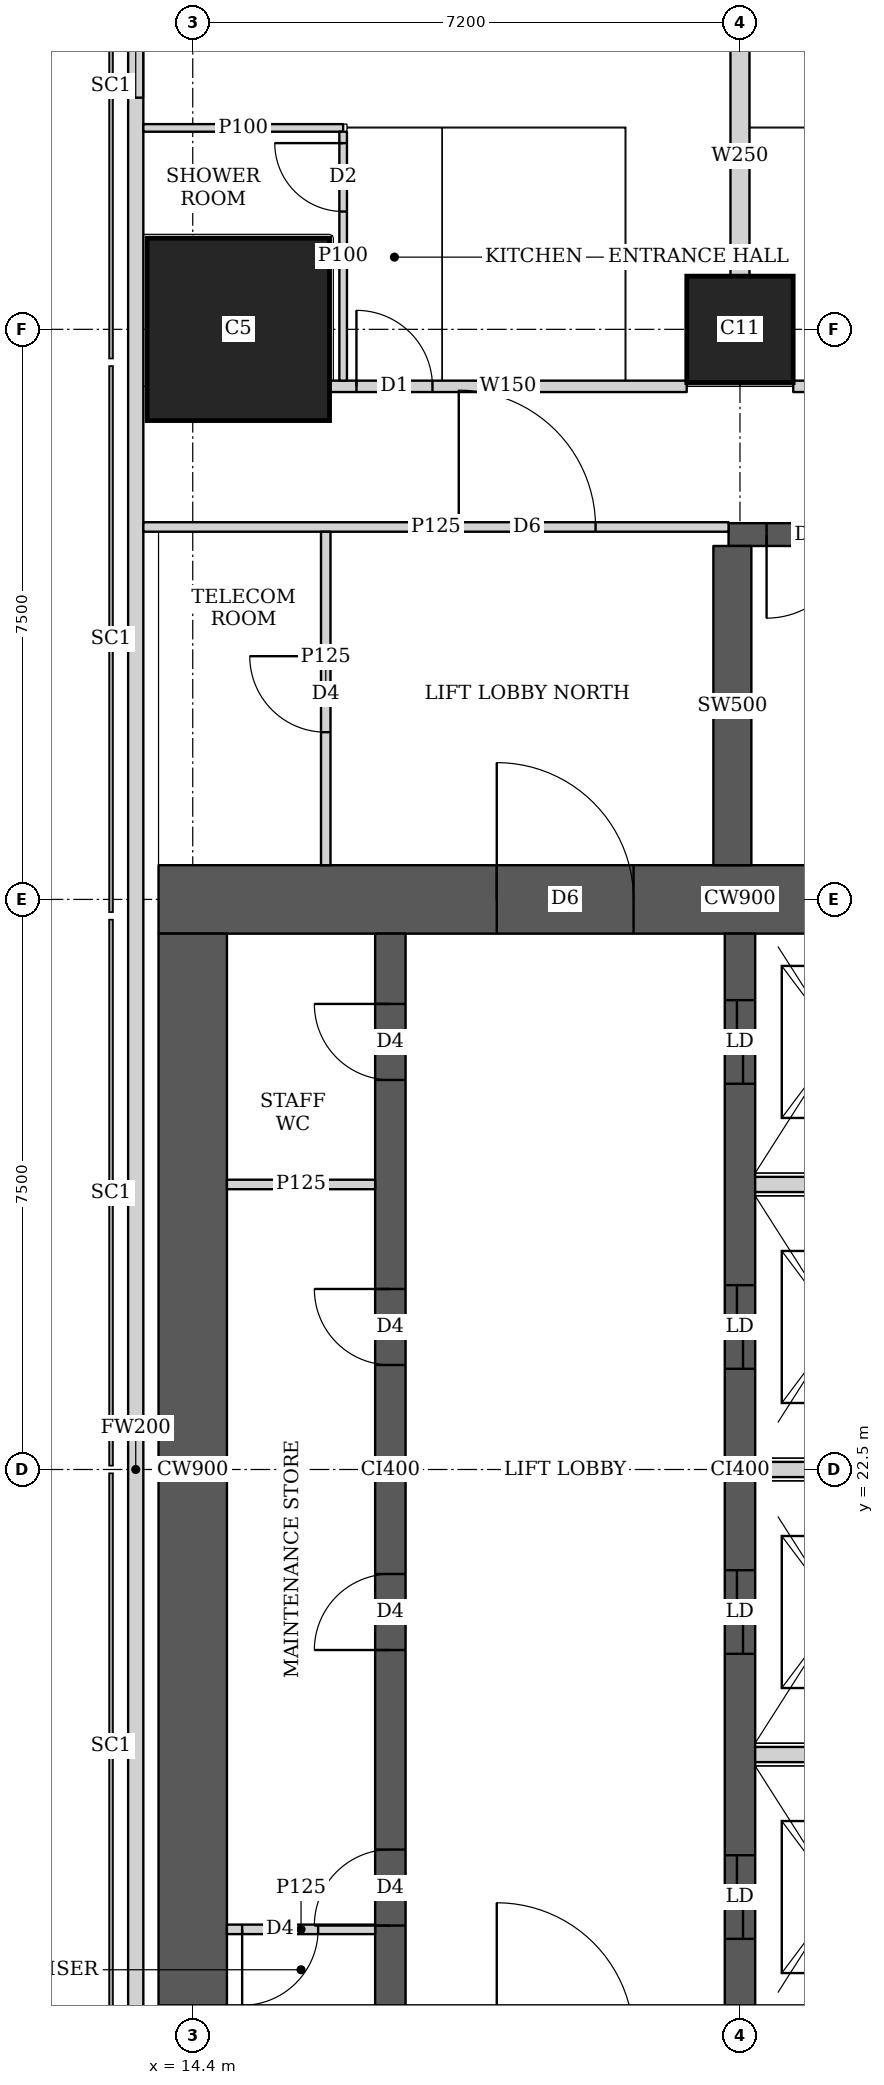
"""IFC4 building model, lengths in metres.
Left out: names, types, materials, properties, quantities, classifications, styles, units other than length and angle.
Written with IfcOpenShell. Run it as: python <this file> out.ifc"""

import sys

from ifc_helpers import new_model, si_unit, direction, frame, frame_2d, origin, origin_2d, place, context, subcontext, project, spatial, rectangle, extrude, element, fill, save


model = new_model("IFC4")
c1 = context("Model", 3, precision=1e-05, world=origin(), true_north=direction((0.0, 1.0)))
c2 = subcontext(c1, "Body", "Model", "MODEL_VIEW")
j1 = project(units=[si_unit("LENGTHUNIT", "METRE"), si_unit("PLANEANGLEUNIT", "RADIAN")], contexts=[c1])
p1 = place(None, origin())
s1 = spatial("IfcSite", under=j1, at=p1, CompositionType="ELEMENT")
p2 = place(p1, origin())
s2 = spatial("IfcBuilding", under=s1, at=p2, CompositionType="ELEMENT")
p3 = place(p2, frame((0.0, 0.0, 234.95)))
s3 = spatial("IfcBuildingStorey", under=s2, at=p3, CompositionType="ELEMENT", Elevation=234.95)
p4 = place(p3, frame((15.0, 37.5, 0.0), z_axis=(0.0, 0.0, 1.0), x_axis=(1.0, 0.0, 0.0)))
e1 = element("IfcColumn", 1, at=p4, inside=s3, PredefinedType="COLUMN", context=c2, shape_type="SweptSolid", body=[
    extrude(rectangle(XDim=2.4, YDim=2.4, at=origin_2d()), origin(), (0.0, 0.0, 1.0), 3.75),
])
p5 = place(p3, frame((21.6, 37.5, 0.0), z_axis=(0.0, 0.0, 1.0), x_axis=(1.0, 0.0, 0.0)))
e2 = element("IfcColumn", 2, at=p5, inside=s3, PredefinedType="COLUMN", context=c2, shape_type="SweptSolid", body=[
    extrude(rectangle(XDim=1.4, YDim=1.4, at=origin_2d()), origin(), (0.0, 0.0, 1.0), 3.75),
])
p6 = place(p3, frame((13.95, 30.0, 0.0), z_axis=(0.0, 0.0, 1.0), x_axis=(1.0, 0.0, 0.0)))
e3 = element("IfcWall", 3, at=p6, inside=s3, PredefinedType="SHEAR", context=c2, shape_type="SweptSolid", body=[
    extrude(rectangle(XDim=15.3, YDim=0.9, at=frame_2d((7.65, 0.0))), origin(), (0.0, 0.0, 1.0), 3.75),
])
p7 = place(p6, frame((4.45, 0.0, 0.0)))
e4 = element("IfcOpeningElement", 4, at=p7, cuts=e3, PredefinedType="OPENING", context=c2, shape_type="SweptSolid", body=[
    extrude(rectangle(XDim=1.8, YDim=2.1, at=frame_2d((0.9, 1.05))), frame((0.0, 0.46, 0.0), z_axis=(0.0, -1.0, 0.0), x_axis=(1.0, 0.0, 0.0)), (0.0, 0.0, 1.0), 0.92),
])
p8 = place(p6, frame((10.7, 0.0, 0.0)))
e5 = element("IfcOpeningElement", 5, at=p8, cuts=e3, PredefinedType="OPENING", context=c2, shape_type="SweptSolid", body=[
    extrude(rectangle(XDim=1.1, YDim=2.1, at=frame_2d((0.55, 1.05))), frame((0.0, 0.46, 0.0), z_axis=(0.0, -1.0, 0.0), x_axis=(1.0, 0.0, 0.0)), (0.0, 0.0, 1.0), 0.92),
])
p9 = place(p3, frame((14.4, 15.45, 0.0), z_axis=(0.0, 0.0, 1.0), x_axis=(0.0, 1.0, 0.0)))
e6 = element("IfcWall", 6, at=p9, inside=s3, PredefinedType="SHEAR", context=c2, shape_type="SweptSolid", body=[
    extrude(rectangle(XDim=14.1, YDim=0.9, at=frame_2d((7.05, 0.0))), origin(), (0.0, 0.0, 1.0), 3.75),
])
p10 = place(p3, frame((17.0, 15.45, 0.0), z_axis=(0.0, 0.0, 1.0), x_axis=(0.0, 1.0, 0.0)))
e7 = element("IfcWall", 7, at=p10, inside=s3, PredefinedType="SHEAR", context=c2, shape_type="SweptSolid", body=[
    extrude(rectangle(XDim=14.1, YDim=0.4, at=frame_2d((7.05, 0.0))), origin(), (0.0, 0.0, 1.0), 3.75),
])
p11 = place(p10, frame((1.05, 0.0, 0.0)))
e8 = element("IfcOpeningElement", 8, at=p11, cuts=e7, PredefinedType="OPENING", context=c2, shape_type="SweptSolid", body=[
    extrude(rectangle(XDim=1.0, YDim=2.1, at=frame_2d((0.5, 1.05))), frame((0.0, 0.21, 0.0), z_axis=(0.0, -1.0, 0.0), x_axis=(1.0, 0.0, 0.0)), (0.0, 0.0, 1.0), 0.42),
])
p12 = place(p10, frame((4.675, 0.0, 0.0)))
e9 = element("IfcOpeningElement", 9, at=p12, cuts=e7, PredefinedType="OPENING", context=c2, shape_type="SweptSolid", body=[
    extrude(rectangle(XDim=1.0, YDim=2.1, at=frame_2d((0.5, 1.05))), frame((0.0, 0.21, 0.0), z_axis=(0.0, -1.0, 0.0), x_axis=(1.0, 0.0, 0.0)), (0.0, 0.0, 1.0), 0.42),
])
p13 = place(p10, frame((8.425, 0.0, 0.0)))
e10 = element("IfcOpeningElement", 10, at=p13, cuts=e7, PredefinedType="OPENING", context=c2, shape_type="SweptSolid", body=[
    extrude(rectangle(XDim=1.0, YDim=2.1, at=frame_2d((0.5, 1.05))), frame((0.0, 0.21, 0.0), z_axis=(0.0, -1.0, 0.0), x_axis=(1.0, 0.0, 0.0)), (0.0, 0.0, 1.0), 0.42),
])
p14 = place(p10, frame((12.175, 0.0, 0.0)))
e11 = element("IfcOpeningElement", 11, at=p14, cuts=e7, PredefinedType="OPENING", context=c2, shape_type="SweptSolid", body=[
    extrude(rectangle(XDim=1.0, YDim=2.1, at=frame_2d((0.5, 1.05))), frame((0.0, 0.21, 0.0), z_axis=(0.0, -1.0, 0.0), x_axis=(1.0, 0.0, 0.0)), (0.0, 0.0, 1.0), 0.42),
])
p15 = place(p3, frame((21.6, 15.45, 0.0), z_axis=(0.0, 0.0, 1.0), x_axis=(0.0, 1.0, 0.0)))
e12 = element("IfcWall", 12, at=p15, inside=s3, PredefinedType="SHEAR", context=c2, shape_type="SweptSolid", body=[
    extrude(rectangle(XDim=14.1, YDim=0.4, at=frame_2d((7.05, 0.0))), origin(), (0.0, 0.0, 1.0), 3.75),
])
p16 = place(p15, frame((0.875, 0.0, 0.0)))
e13 = element("IfcOpeningElement", 13, at=p16, cuts=e12, PredefinedType="OPENING", context=c2, shape_type="SweptSolid", body=[
    extrude(rectangle(XDim=1.1, YDim=2.1, at=frame_2d((0.55, 1.05))), frame((0.0, 0.21, 0.0), z_axis=(0.0, -1.0, 0.0), x_axis=(1.0, 0.0, 0.0)), (0.0, 0.0, 1.0), 0.42),
])
p17 = place(p15, frame((4.625, 0.0, 0.0)))
e14 = element("IfcOpeningElement", 14, at=p17, cuts=e12, PredefinedType="OPENING", context=c2, shape_type="SweptSolid", body=[
    extrude(rectangle(XDim=1.1, YDim=2.1, at=frame_2d((0.55, 1.05))), frame((0.0, 0.21, 0.0), z_axis=(0.0, -1.0, 0.0), x_axis=(1.0, 0.0, 0.0)), (0.0, 0.0, 1.0), 0.42),
])
p18 = place(p15, frame((8.375, 0.0, 0.0)))
e15 = element("IfcOpeningElement", 15, at=p18, cuts=e12, PredefinedType="OPENING", context=c2, shape_type="SweptSolid", body=[
    extrude(rectangle(XDim=1.1, YDim=2.1, at=frame_2d((0.55, 1.05))), frame((0.0, 0.21, 0.0), z_axis=(0.0, -1.0, 0.0), x_axis=(1.0, 0.0, 0.0)), (0.0, 0.0, 1.0), 0.42),
])
p19 = place(p15, frame((12.125, 0.0, 0.0)))
e16 = element("IfcOpeningElement", 16, at=p19, cuts=e12, PredefinedType="OPENING", context=c2, shape_type="SweptSolid", body=[
    extrude(rectangle(XDim=1.1, YDim=2.1, at=frame_2d((0.55, 1.05))), frame((0.0, 0.21, 0.0), z_axis=(0.0, -1.0, 0.0), x_axis=(1.0, 0.0, 0.0)), (0.0, 0.0, 1.0), 0.42),
])
p20 = place(p3, frame((21.45, 34.8, 0.0), z_axis=(0.0, 0.0, 1.0), x_axis=(1.0, 0.0, 0.0)))
e17 = element("IfcWall", 17, at=p20, inside=s3, PredefinedType="SHEAR", context=c2, shape_type="SweptSolid", body=[
    extrude(rectangle(XDim=7.5, YDim=0.3, at=frame_2d((3.75, 0.0))), origin(), (0.0, 0.0, 1.0), 3.75),
])
p21 = place(p20, frame((0.5, 0.0, 0.0)))
e18 = element("IfcOpeningElement", 18, at=p21, cuts=e17, PredefinedType="OPENING", context=c2, shape_type="SweptSolid", body=[
    extrude(rectangle(XDim=1.1, YDim=2.1, at=frame_2d((0.55, 1.05))), frame((0.0, 0.16, 0.0), z_axis=(0.0, -1.0, 0.0), x_axis=(1.0, 0.0, 0.0)), (0.0, 0.0, 1.0), 0.32),
])
p22 = place(p3, frame((21.5, 30.45, 0.0), z_axis=(0.0, 0.0, 1.0), x_axis=(0.0, 1.0, 0.0)))
e19 = element("IfcWall", 19, at=p22, inside=s3, PredefinedType="SHEAR", context=c2, shape_type="SweptSolid", body=[
    extrude(rectangle(XDim=4.2, YDim=0.5, at=frame_2d((2.1, 0.0))), origin(), (0.0, 0.0, 1.0), 3.75),
])
p23 = place(p3, frame((13.65, 44.837, 0.0), z_axis=(0.0, 0.0, 1.0), x_axis=(0.0, -1.0, 0.0)))
e20 = element("IfcWall", 20, at=p23, inside=s3, PredefinedType="SOLIDWALL", context=c2, shape_type="SweptSolid", body=[
    extrude(rectangle(XDim=44.674, YDim=0.2, at=frame_2d((22.337, 0.0))), origin(), (0.0, 0.0, 1.0), 3.5),
])
p24 = place(p23, frame((1.889, 0.0, 0.9)))
e21 = element("IfcOpeningElement", 21, at=p24, cuts=e20, PredefinedType="OPENING", context=c2, shape_type="SweptSolid", body=[
    extrude(rectangle(XDim=2.4, YDim=1.5, at=frame_2d((1.2, 0.75))), frame((0.0, 0.11, 0.0), z_axis=(0.0, -1.0, 0.0), x_axis=(1.0, 0.0, 0.0)), (0.0, 0.0, 1.0), 0.22),
])
p25 = place(p23, frame((40.385, 0.0, 0.9)))
e22 = element("IfcOpeningElement", 22, at=p25, cuts=e20, PredefinedType="OPENING", context=c2, shape_type="SweptSolid", body=[
    extrude(rectangle(XDim=2.4, YDim=1.5, at=frame_2d((1.2, 0.75))), frame((0.0, 0.11, 0.0), z_axis=(0.0, -1.0, 0.0), x_axis=(1.0, 0.0, 0.0)), (0.0, 0.0, 1.0), 0.22),
])
p26 = place(p3, frame((16.201, 36.75, 0.0), z_axis=(0.0, 0.0, 1.0), x_axis=(1.0, 0.0, 0.0)))
e23 = element("IfcWall", 23, at=p26, inside=s3, PredefinedType="SOLIDWALL", context=c2, shape_type="SweptSolid", body=[
    extrude(rectangle(XDim=4.698, YDim=0.15, at=frame_2d((2.349, 0.0))), origin(), (0.0, 0.0, 1.0), 3.5),
])
p27 = place(p26, frame((0.353, 0.0, 0.0)))
e24 = element("IfcOpeningElement", 24, at=p27, cuts=e23, PredefinedType="OPENING", context=c2, shape_type="SweptSolid", body=[
    extrude(rectangle(XDim=1.0, YDim=2.1, at=frame_2d((0.5, 1.05))), frame((0.0, 0.085, 0.0), z_axis=(0.0, -1.0, 0.0), x_axis=(1.0, 0.0, 0.0)), (0.0, 0.0, 1.0), 0.17),
])
p28 = place(p3, frame((22.301, 36.75, 0.0), z_axis=(0.0, 0.0, 1.0), x_axis=(1.0, 0.0, 0.0)))
e25 = element("IfcWall", 25, at=p28, inside=s3, PredefinedType="SOLIDWALL", context=c2, shape_type="SweptSolid", body=[
    extrude(rectangle(XDim=5.798, YDim=0.15, at=frame_2d((2.899, 0.0))), origin(), (0.0, 0.0, 1.0), 3.5),
])
p29 = place(p28, frame((0.799, 0.0, 0.0)))
e26 = element("IfcOpeningElement", 26, at=p29, cuts=e25, PredefinedType="OPENING", context=c2, shape_type="SweptSolid", body=[
    extrude(rectangle(XDim=1.0, YDim=2.1, at=frame_2d((0.5, 1.05))), frame((0.0, 0.085, 0.0), z_axis=(0.0, -1.0, 0.0), x_axis=(1.0, 0.0, 0.0)), (0.0, 0.0, 1.0), 0.17),
])
p30 = place(p3, frame((13.75, 40.15, 0.0), z_axis=(0.0, 0.0, 1.0), x_axis=(1.0, 0.0, 0.0)))
e27 = element("IfcWall", 27, at=p30, inside=s3, PredefinedType="PARTITIONING", context=c2, shape_type="SweptSolid", body=[
    extrude(rectangle(XDim=2.629, YDim=0.1, at=frame_2d((1.314, 0.0))), origin(), (0.0, 0.0, 1.0), 2.05),
])
p31 = place(p3, frame((16.379, 36.825, 0.0), z_axis=(0.0, 0.0, 1.0), x_axis=(0.0, 1.0, 0.0)))
e28 = element("IfcWall", 28, at=p31, inside=s3, PredefinedType="PARTITIONING", context=c2, shape_type="SweptSolid", body=[
    extrude(rectangle(XDim=3.275, YDim=0.1, at=frame_2d((1.638, 0.0))), origin(), (0.0, 0.0, 1.0), 3.5),
])
p32 = place(p31, frame((2.225, 0.0, 0.0)))
e29 = element("IfcOpeningElement", 29, at=p32, cuts=e28, PredefinedType="OPENING", context=c2, shape_type="SweptSolid", body=[
    extrude(rectangle(XDim=0.9, YDim=2.1, at=frame_2d((0.45, 1.05))), frame((0.0, 0.06, 0.0), z_axis=(0.0, -1.0, 0.0), x_axis=(1.0, 0.0, 0.0)), (0.0, 0.0, 1.0), 0.12),
])
p33 = place(p3, frame((21.6, 38.201, 0.0), z_axis=(0.0, 0.0, 1.0), x_axis=(0.0, 1.0, 0.0)))
e30 = element("IfcWall", 30, at=p33, inside=s3, PredefinedType="SOLIDWALL", context=c2, shape_type="SweptSolid", body=[
    extrude(rectangle(XDim=3.149, YDim=0.25, at=frame_2d((1.575, 0.0))), origin(), (0.0, 0.0, 1.0), 3.5),
])
p34 = place(p3, frame((13.75, 34.9, 0.0), z_axis=(0.0, 0.0, 1.0), x_axis=(1.0, 0.0, 0.0)))
e31 = element("IfcWall", 31, at=p34, inside=s3, PredefinedType="PARTITIONING", context=c2, shape_type="SweptSolid", body=[
    extrude(rectangle(XDim=7.7, YDim=0.125, at=frame_2d((3.85, 0.0))), origin(), (0.0, 0.0, 1.0), 3.5),
])
p35 = place(p34, frame((4.15, 0.0, 0.0)))
e32 = element("IfcOpeningElement", 32, at=p35, cuts=e31, PredefinedType="OPENING", context=c2, shape_type="SweptSolid", body=[
    extrude(rectangle(XDim=1.8, YDim=2.1, at=frame_2d((0.9, 1.05))), frame((0.0, 0.073, 0.0), z_axis=(0.0, -1.0, 0.0), x_axis=(1.0, 0.0, 0.0)), (0.0, 0.0, 1.0), 0.145),
])
p36 = place(p3, frame((16.15, 30.45, 0.0), z_axis=(0.0, 0.0, 1.0), x_axis=(0.0, 1.0, 0.0)))
e33 = element("IfcWall", 33, at=p36, inside=s3, PredefinedType="PARTITIONING", context=c2, shape_type="SweptSolid", body=[
    extrude(rectangle(XDim=4.387, YDim=0.125, at=frame_2d((2.193, 0.0))), origin(), (0.0, 0.0, 1.0), 3.5),
])
p37 = place(p36, frame((1.75, 0.0, 0.0)))
e34 = element("IfcOpeningElement", 34, at=p37, cuts=e33, PredefinedType="OPENING", context=c2, shape_type="SweptSolid", body=[
    extrude(rectangle(XDim=1.0, YDim=2.1, at=frame_2d((0.5, 1.05))), frame((0.0, 0.073, 0.0), z_axis=(0.0, -1.0, 0.0), x_axis=(1.0, 0.0, 0.0)), (0.0, 0.0, 1.0), 0.145),
])
p38 = place(p3, frame((14.85, 16.45, 0.0), z_axis=(0.0, 0.0, 1.0), x_axis=(1.0, 0.0, 0.0)))
e35 = element("IfcWall", 35, at=p38, inside=s3, PredefinedType="PARTITIONING", context=c2, shape_type="SweptSolid", body=[
    extrude(rectangle(XDim=1.95, YDim=0.125, at=frame_2d((0.975, 0.0))), origin(), (0.0, 0.0, 1.0), 3.5),
])
p39 = place(p38, frame((0.2, 0.0, 0.0)))
e36 = element("IfcOpeningElement", 36, at=p39, cuts=e35, PredefinedType="OPENING", context=c2, shape_type="SweptSolid", body=[
    extrude(rectangle(XDim=1.0, YDim=2.1, at=frame_2d((0.5, 1.05))), frame((0.0, 0.073, 0.0), z_axis=(0.0, -1.0, 0.0), x_axis=(1.0, 0.0, 0.0)), (0.0, 0.0, 1.0), 0.145),
])
p40 = place(p3, frame((14.85, 26.25, 0.0), z_axis=(0.0, 0.0, 1.0), x_axis=(1.0, 0.0, 0.0)))
e37 = element("IfcWall", 37, at=p40, inside=s3, PredefinedType="PARTITIONING", context=c2, shape_type="SweptSolid", body=[
    extrude(rectangle(XDim=1.95, YDim=0.125, at=frame_2d((0.975, 0.0))), origin(), (0.0, 0.0, 1.0), 3.5),
])
for number, where, z_axis, x_axis in (
    (38, (21.8, 18.75, 0.0), (0.0, 0.0, 1.0), (1.0, 0.0, 0.0)),
    (39, (21.8, 22.5, 0.0), (0.0, 0.0, 1.0), (1.0, 0.0, 0.0)),
    (40, (21.8, 26.25, 0.0), (0.0, 0.0, 1.0), (1.0, 0.0, 0.0)),
):
    element("IfcWall", number, at=place(p3, frame(where, z_axis=z_axis, x_axis=x_axis)), inside=s3, PredefinedType="SOLIDWALL", context=c2, shape_type="SweptSolid", body=[
        extrude(rectangle(XDim=2.2, YDim=0.2, at=frame_2d((1.1, 0.0))), origin(), (0.0, 0.0, 1.0), 3.5),
    ])
p41 = place(p24, origin())
e41 = element("IfcWindow", 41, at=p41, inside=s3, PartitioningType="SINGLE_PANEL", PredefinedType="WINDOW", context=c2, shape_type="SweptSolid", body=[
    extrude(rectangle(XDim=2.4, YDim=1.5, at=frame_2d((1.2, 0.75))), frame((0.0, 0.03, 0.0), z_axis=(0.0, -1.0, 0.0), x_axis=(1.0, 0.0, 0.0)), (0.0, 0.0, 1.0), 0.06),
])
fill(e21, e41)
p42 = place(p32, origin())
e42 = element("IfcDoor", 42, at=p42, inside=s3, OperationType="SINGLE_SWING_RIGHT", PredefinedType="DOOR", context=c2, shape_type="SweptSolid", body=[
    extrude(rectangle(XDim=0.9, YDim=2.1, at=frame_2d((0.45, 1.05))), frame((0.0, 0.025, 0.0), z_axis=(0.0, -1.0, 0.0), x_axis=(1.0, 0.0, 0.0)), (0.0, 0.0, 1.0), 0.05),
])
fill(e29, e42)
p43 = place(p27, origin())
e43 = element("IfcDoor", 43, at=p43, inside=s3, OperationType="SINGLE_SWING_LEFT", PredefinedType="DOOR", context=c2, shape_type="SweptSolid", body=[
    extrude(rectangle(XDim=1.0, YDim=2.1, at=frame_2d((0.5, 1.05))), frame((0.0, 0.025, 0.0), z_axis=(0.0, -1.0, 0.0), x_axis=(1.0, 0.0, 0.0)), (0.0, 0.0, 1.0), 0.05),
])
fill(e24, e43)
p44 = place(p37, origin())
e44 = element("IfcDoor", 44, at=p44, inside=s3, OperationType="SINGLE_SWING_RIGHT", PredefinedType="DOOR", context=c2, shape_type="SweptSolid", body=[
    extrude(rectangle(XDim=1.0, YDim=2.1, at=frame_2d((0.5, 1.05))), frame((0.0, 0.025, 0.0), z_axis=(0.0, -1.0, 0.0), x_axis=(1.0, 0.0, 0.0)), (0.0, 0.0, 1.0), 0.05),
])
fill(e34, e44)
p45 = place(p35, origin())
e45 = element("IfcDoor", 45, at=p45, inside=s3, OperationType="DOUBLE_DOOR_SINGLE_SWING", PredefinedType="DOOR", context=c2, shape_type="SweptSolid", body=[
    extrude(rectangle(XDim=1.8, YDim=2.1, at=frame_2d((0.9, 1.05))), frame((0.0, 0.025, 0.0), z_axis=(0.0, -1.0, 0.0), x_axis=(1.0, 0.0, 0.0)), (0.0, 0.0, 1.0), 0.05),
])
fill(e32, e45)
p46 = place(p39, origin())
e46 = element("IfcDoor", 46, at=p46, inside=s3, OperationType="SINGLE_SWING_RIGHT", PredefinedType="DOOR", context=c2, shape_type="SweptSolid", body=[
    extrude(rectangle(XDim=1.0, YDim=2.1, at=frame_2d((0.5, 1.05))), frame((0.0, 0.025, 0.0), z_axis=(0.0, -1.0, 0.0), x_axis=(1.0, 0.0, 0.0)), (0.0, 0.0, 1.0), 0.05),
])
fill(e36, e46)
p47 = place(p11, origin())
e47 = element("IfcDoor", 47, at=p47, inside=s3, OperationType="SINGLE_SWING_LEFT", PredefinedType="DOOR", context=c2, shape_type="SweptSolid", body=[
    extrude(rectangle(XDim=1.0, YDim=2.1, at=frame_2d((0.5, 1.05))), frame((0.0, 0.025, 0.0), z_axis=(0.0, -1.0, 0.0), x_axis=(1.0, 0.0, 0.0)), (0.0, 0.0, 1.0), 0.05),
])
fill(e8, e47)
p48 = place(p12, origin())
e48 = element("IfcDoor", 48, at=p48, inside=s3, OperationType="SINGLE_SWING_LEFT", PredefinedType="DOOR", context=c2, shape_type="SweptSolid", body=[
    extrude(rectangle(XDim=1.0, YDim=2.1, at=frame_2d((0.5, 1.05))), frame((0.0, 0.025, 0.0), z_axis=(0.0, -1.0, 0.0), x_axis=(1.0, 0.0, 0.0)), (0.0, 0.0, 1.0), 0.05),
])
fill(e9, e48)
p49 = place(p13, origin())
e49 = element("IfcDoor", 49, at=p49, inside=s3, OperationType="SINGLE_SWING_RIGHT", PredefinedType="DOOR", context=c2, shape_type="SweptSolid", body=[
    extrude(rectangle(XDim=1.0, YDim=2.1, at=frame_2d((0.5, 1.05))), frame((0.0, 0.025, 0.0), z_axis=(0.0, -1.0, 0.0), x_axis=(1.0, 0.0, 0.0)), (0.0, 0.0, 1.0), 0.05),
])
fill(e10, e49)
p50 = place(p14, origin())
e50 = element("IfcDoor", 50, at=p50, inside=s3, OperationType="SINGLE_SWING_RIGHT", PredefinedType="DOOR", context=c2, shape_type="SweptSolid", body=[
    extrude(rectangle(XDim=1.0, YDim=2.1, at=frame_2d((0.5, 1.05))), frame((0.0, 0.025, 0.0), z_axis=(0.0, -1.0, 0.0), x_axis=(1.0, 0.0, 0.0)), (0.0, 0.0, 1.0), 0.05),
])
fill(e11, e50)
p51 = place(p7, origin())
e51 = element("IfcDoor", 51, at=p51, inside=s3, OperationType="DOUBLE_DOOR_SINGLE_SWING", PredefinedType="DOOR", context=c2, shape_type="SweptSolid", body=[
    extrude(rectangle(XDim=1.8, YDim=2.1, at=frame_2d((0.9, 1.05))), frame((0.0, 0.025, 0.0), z_axis=(0.0, -1.0, 0.0), x_axis=(1.0, 0.0, 0.0)), (0.0, 0.0, 1.0), 0.05),
])
fill(e4, e51)
p52 = place(p16, origin())
e52 = element("IfcDoor", 52, at=p52, inside=s3, OperationType="DOUBLE_DOOR_SLIDING", PredefinedType="DOOR", context=c2, shape_type="SweptSolid", body=[
    extrude(rectangle(XDim=1.1, YDim=2.1, at=frame_2d((0.55, 1.05))), frame((0.0, 0.025, 0.0), z_axis=(0.0, -1.0, 0.0), x_axis=(1.0, 0.0, 0.0)), (0.0, 0.0, 1.0), 0.05),
])
fill(e13, e52)
p53 = place(p17, origin())
e53 = element("IfcDoor", 53, at=p53, inside=s3, OperationType="DOUBLE_DOOR_SLIDING", PredefinedType="DOOR", context=c2, shape_type="SweptSolid", body=[
    extrude(rectangle(XDim=1.1, YDim=2.1, at=frame_2d((0.55, 1.05))), frame((0.0, 0.025, 0.0), z_axis=(0.0, -1.0, 0.0), x_axis=(1.0, 0.0, 0.0)), (0.0, 0.0, 1.0), 0.05),
])
fill(e14, e53)
p54 = place(p18, origin())
e54 = element("IfcDoor", 54, at=p54, inside=s3, OperationType="DOUBLE_DOOR_SLIDING", PredefinedType="DOOR", context=c2, shape_type="SweptSolid", body=[
    extrude(rectangle(XDim=1.1, YDim=2.1, at=frame_2d((0.55, 1.05))), frame((0.0, 0.025, 0.0), z_axis=(0.0, -1.0, 0.0), x_axis=(1.0, 0.0, 0.0)), (0.0, 0.0, 1.0), 0.05),
])
fill(e15, e54)
p55 = place(p19, origin())
e55 = element("IfcDoor", 55, at=p55, inside=s3, OperationType="DOUBLE_DOOR_SLIDING", PredefinedType="DOOR", context=c2, shape_type="SweptSolid", body=[
    extrude(rectangle(XDim=1.1, YDim=2.1, at=frame_2d((0.55, 1.05))), frame((0.0, 0.025, 0.0), z_axis=(0.0, -1.0, 0.0), x_axis=(1.0, 0.0, 0.0)), (0.0, 0.0, 1.0), 0.05),
])
fill(e16, e55)
p56 = place(p21, origin())
e56 = element("IfcDoor", 56, at=p56, inside=s3, OperationType="SINGLE_SWING_RIGHT", PredefinedType="DOOR", context=c2, shape_type="SweptSolid", body=[
    extrude(rectangle(XDim=1.1, YDim=2.1, at=frame_2d((0.55, 1.05))), frame((0.0, 0.025, 0.0), z_axis=(0.0, -1.0, 0.0), x_axis=(1.0, 0.0, 0.0)), (0.0, 0.0, 1.0), 0.05),
])
fill(e18, e56)
save(model, sys.argv[1])
